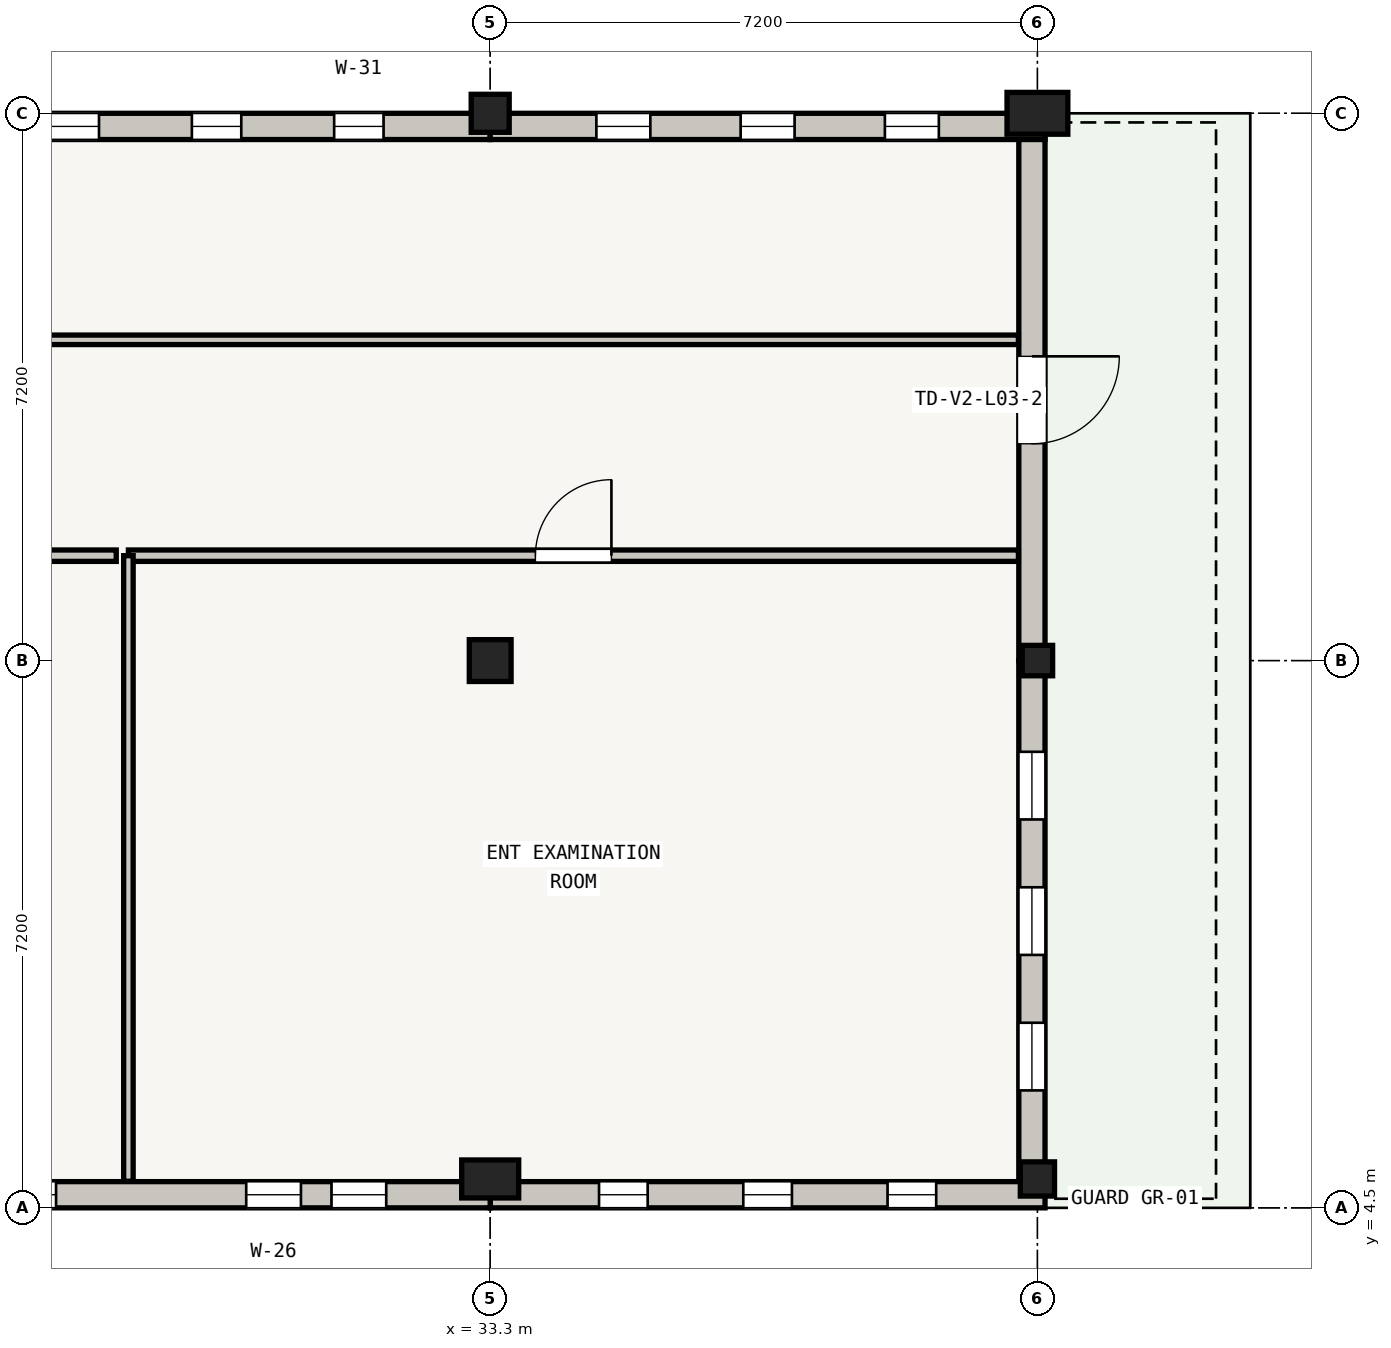
"""IFC4 building model, lengths in metres.
Left out: names, types, materials, properties, quantities, classifications, styles, units other than length and angle.
Written with IfcOpenShell. Run it as: python <this file> out.ifc"""

import sys

from ifc_helpers import new_model, si_unit, direction, frame, frame_2d, origin, origin_2d, place, context, subcontext, project, spatial, rectangle, extrude, element, fill, save


model = new_model("IFC4")
c1 = context("Model", 3, precision=1e-05, world=origin(), true_north=direction((0.0, 1.0)))
c2 = subcontext(c1, "Body", "Model", "MODEL_VIEW")
j1 = project(units=[si_unit("LENGTHUNIT", "METRE"), si_unit("PLANEANGLEUNIT", "RADIAN")], contexts=[c1])
p1 = place(None, origin())
s1 = spatial("IfcSite", under=j1, at=p1, CompositionType="ELEMENT")
p2 = place(p1, origin())
s2 = spatial("IfcBuilding", under=s1, at=p2, CompositionType="ELEMENT")
p3 = place(p2, frame((0.0, 0.0, 12.9)))
s3 = spatial("IfcBuildingStorey", under=s2, at=p3, CompositionType="ELEMENT", Elevation=12.9)
p4 = place(p3, frame((33.3, 4.88, 0.0), z_axis=(0.0, 0.0, 1.0), x_axis=(1.0, 0.0, 0.0)))
e1 = element("IfcColumn", 1, at=p4, inside=s3, PredefinedType="COLUMN", context=c2, shape_type="SweptSolid", body=[
    extrude(rectangle(XDim=0.75, YDim=0.5, at=origin_2d()), origin(), (0.0, 0.0, 1.0), 3.92),
])
p5 = place(p3, frame((33.3, 11.7, 0.0), z_axis=(0.0, 0.0, 1.0), x_axis=(1.0, 0.0, 0.0)))
e2 = element("IfcColumn", 2, at=p5, inside=s3, PredefinedType="COLUMN", context=c2, shape_type="SweptSolid", body=[
    extrude(rectangle(XDim=0.55, YDim=0.55, at=origin_2d()), origin(), (0.0, 0.0, 1.0), 3.92),
])
p6 = place(p3, frame((33.3, 18.9, 0.0), z_axis=(0.0, 0.0, 1.0), x_axis=(1.0, 0.0, 0.0)))
e3 = element("IfcColumn", 3, at=p6, inside=s3, PredefinedType="COLUMN", context=c2, shape_type="SweptSolid", body=[
    extrude(rectangle(XDim=0.5, YDim=0.5, at=origin_2d()), origin(), (0.0, 0.0, 1.0), 3.92),
])
p7 = place(p3, frame((40.5, 4.88, 0.0), z_axis=(0.0, 0.0, 1.0), x_axis=(1.0, 0.0, 0.0)))
e4 = element("IfcColumn", 4, at=p7, inside=s3, PredefinedType="COLUMN", context=c2, shape_type="SweptSolid", body=[
    extrude(rectangle(XDim=0.45, YDim=0.45, at=origin_2d()), origin(), (0.0, 0.0, 1.0), 3.92),
])
p8 = place(p3, frame((40.5, 11.7, 0.0), z_axis=(0.0, 0.0, 1.0), x_axis=(1.0, 0.0, 0.0)))
e5 = element("IfcColumn", 5, at=p8, inside=s3, PredefinedType="COLUMN", context=c2, shape_type="SweptSolid", body=[
    extrude(rectangle(XDim=0.4, YDim=0.4, at=origin_2d()), origin(), (0.0, 0.0, 1.0), 3.92),
])
p9 = place(p3, frame((40.5, 18.9, 0.0), z_axis=(0.0, 0.0, 1.0), x_axis=(1.0, 0.0, 0.0)))
e6 = element("IfcColumn", 6, at=p9, inside=s3, PredefinedType="COLUMN", context=c2, shape_type="SweptSolid", body=[
    extrude(rectangle(XDim=0.8, YDim=0.55, at=origin_2d()), origin(), (0.0, 0.0, 1.0), 3.92),
])
p10 = place(p3, frame((26.1, 18.728, 0.0), z_axis=(0.0, 0.0, 1.0), x_axis=(1.0, 0.0, 0.0)))
e7 = element("IfcWall", 7, at=p10, inside=s3, PredefinedType="SOLIDWALL", context=c2, shape_type="SweptSolid", body=[
    extrude(rectangle(XDim=7.2, YDim=0.345, at=frame_2d((3.6, 0.0))), origin(), (0.0, 0.0, 1.0), 3.105),
])
p11 = place(p10, frame((1.403, 0.0, 0.55)))
e8 = element("IfcOpeningElement", 8, at=p11, cuts=e7, PredefinedType="OPENING", context=c2, shape_type="SweptSolid", body=[
    extrude(rectangle(XDim=0.65, YDim=2.14, at=frame_2d((0.325, 1.07))), frame((0.0, 0.172, 0.0), z_axis=(0.0, -1.0, 0.0), x_axis=(1.0, 0.0, 0.0)), (0.0, 0.0, 1.0), 0.345),
])
p12 = place(p10, frame((3.275, 0.0, 0.55)))
e9 = element("IfcOpeningElement", 9, at=p12, cuts=e7, PredefinedType="OPENING", context=c2, shape_type="SweptSolid", body=[
    extrude(rectangle(XDim=0.65, YDim=2.14, at=frame_2d((0.325, 1.07))), frame((0.0, 0.172, 0.0), z_axis=(0.0, -1.0, 0.0), x_axis=(1.0, 0.0, 0.0)), (0.0, 0.0, 1.0), 0.345),
])
p13 = place(p10, frame((5.147, 0.0, 0.55)))
e10 = element("IfcOpeningElement", 10, at=p13, cuts=e7, PredefinedType="OPENING", context=c2, shape_type="SweptSolid", body=[
    extrude(rectangle(XDim=0.65, YDim=2.14, at=frame_2d((0.325, 1.07))), frame((0.0, 0.172, 0.0), z_axis=(0.0, -1.0, 0.0), x_axis=(1.0, 0.0, 0.0)), (0.0, 0.0, 1.0), 0.345),
])
p14 = place(p3, frame((33.3, 18.728, 0.0), z_axis=(0.0, 0.0, 1.0), x_axis=(1.0, 0.0, 0.0)))
e11 = element("IfcWall", 11, at=p14, inside=s3, PredefinedType="SOLIDWALL", context=c2, shape_type="SweptSolid", body=[
    extrude(rectangle(XDim=7.3, YDim=0.345, at=frame_2d((3.65, 0.0))), origin(), (0.0, 0.0, 1.0), 3.105),
])
p15 = place(p14, frame((1.397, 0.0, 0.55)))
e12 = element("IfcOpeningElement", 12, at=p15, cuts=e11, PredefinedType="OPENING", context=c2, shape_type="SweptSolid", body=[
    extrude(rectangle(XDim=0.71, YDim=2.14, at=frame_2d((0.355, 1.07))), frame((0.0, 0.172, 0.0), z_axis=(0.0, -1.0, 0.0), x_axis=(1.0, 0.0, 0.0)), (0.0, 0.0, 1.0), 0.345),
])
p16 = place(p14, frame((3.295, 0.0, 0.55)))
e13 = element("IfcOpeningElement", 13, at=p16, cuts=e11, PredefinedType="OPENING", context=c2, shape_type="SweptSolid", body=[
    extrude(rectangle(XDim=0.71, YDim=2.14, at=frame_2d((0.355, 1.07))), frame((0.0, 0.172, 0.0), z_axis=(0.0, -1.0, 0.0), x_axis=(1.0, 0.0, 0.0)), (0.0, 0.0, 1.0), 0.345),
])
p17 = place(p14, frame((5.193, 0.0, 0.55)))
e14 = element("IfcOpeningElement", 14, at=p17, cuts=e11, PredefinedType="OPENING", context=c2, shape_type="SweptSolid", body=[
    extrude(rectangle(XDim=0.71, YDim=2.14, at=frame_2d((0.355, 1.07))), frame((0.0, 0.172, 0.0), z_axis=(0.0, -1.0, 0.0), x_axis=(1.0, 0.0, 0.0)), (0.0, 0.0, 1.0), 0.345),
])
p18 = place(p3, frame((40.427, 18.555, 0.0), z_axis=(0.0, 0.0, 1.0), x_axis=(0.0, -1.0, 0.0)))
e15 = element("IfcWall", 15, at=p18, inside=s3, PredefinedType="SOLIDWALL", context=c2, shape_type="SweptSolid", body=[
    extrude(rectangle(XDim=6.855, YDim=0.345, at=frame_2d((3.427, 0.0))), origin(), (0.0, 0.0, 1.0), 2.955),
])
p19 = place(p18, frame((2.853, 0.0, 0.19)))
e16 = element("IfcOpeningElement", 16, at=p19, cuts=e15, PredefinedType="OPENING", context=c2, shape_type="SweptSolid", body=[
    extrude(rectangle(XDim=1.15, YDim=2.02, at=frame_2d((0.575, 1.01))), frame((0.0, 0.172, 0.0), z_axis=(0.0, -1.0, 0.0), x_axis=(1.0, 0.0, 0.0)), (0.0, 0.0, 1.0), 0.345),
])
p20 = place(p3, frame((40.427, 11.7, 0.0), z_axis=(0.0, 0.0, 1.0), x_axis=(0.0, -1.0, 0.0)))
e17 = element("IfcWall", 17, at=p20, inside=s3, PredefinedType="SOLIDWALL", context=c2, shape_type="SweptSolid", body=[
    extrude(rectangle(XDim=6.855, YDim=0.345, at=frame_2d((3.427, 0.0))), origin(), (0.0, 0.0, 1.0), 2.955),
])
p21 = place(p20, frame((1.2, 0.0, 0.55)))
e18 = element("IfcOpeningElement", 18, at=p21, cuts=e17, PredefinedType="OPENING", context=c2, shape_type="SweptSolid", body=[
    extrude(rectangle(XDim=0.89, YDim=2.02, at=frame_2d((0.445, 1.01))), frame((0.0, 0.172, 0.0), z_axis=(0.0, -1.0, 0.0), x_axis=(1.0, 0.0, 0.0)), (0.0, 0.0, 1.0), 0.345),
])
p22 = place(p20, frame((2.982, 0.0, 0.55)))
e19 = element("IfcOpeningElement", 19, at=p22, cuts=e17, PredefinedType="OPENING", context=c2, shape_type="SweptSolid", body=[
    extrude(rectangle(XDim=0.89, YDim=2.02, at=frame_2d((0.445, 1.01))), frame((0.0, 0.172, 0.0), z_axis=(0.0, -1.0, 0.0), x_axis=(1.0, 0.0, 0.0)), (0.0, 0.0, 1.0), 0.345),
])
p23 = place(p20, frame((4.765, 0.0, 0.55)))
e20 = element("IfcOpeningElement", 20, at=p23, cuts=e17, PredefinedType="OPENING", context=c2, shape_type="SweptSolid", body=[
    extrude(rectangle(XDim=0.89, YDim=2.02, at=frame_2d((0.445, 1.01))), frame((0.0, 0.172, 0.0), z_axis=(0.0, -1.0, 0.0), x_axis=(1.0, 0.0, 0.0)), (0.0, 0.0, 1.0), 0.345),
])
p24 = place(p3, frame((40.6, 4.673, 0.0), z_axis=(0.0, 0.0, 1.0), x_axis=(-1.0, 0.0, 0.0)))
e21 = element("IfcWall", 21, at=p24, inside=s3, PredefinedType="SOLIDWALL", context=c2, shape_type="SweptSolid", body=[
    extrude(rectangle(XDim=7.3, YDim=0.345, at=frame_2d((3.65, 0.0))), origin(), (0.0, 0.0, 1.0), 2.955),
])
p25 = place(p24, frame((1.432, 0.0, 0.55)))
e22 = element("IfcOpeningElement", 22, at=p25, cuts=e21, PredefinedType="OPENING", context=c2, shape_type="SweptSolid", body=[
    extrude(rectangle(XDim=0.64, YDim=1.85, at=frame_2d((0.32, 0.925))), frame((0.0, 0.172, 0.0), z_axis=(0.0, -1.0, 0.0), x_axis=(1.0, 0.0, 0.0)), (0.0, 0.0, 1.0), 0.345),
])
p26 = place(p24, frame((3.33, 0.0, 0.55)))
e23 = element("IfcOpeningElement", 23, at=p26, cuts=e21, PredefinedType="OPENING", context=c2, shape_type="SweptSolid", body=[
    extrude(rectangle(XDim=0.64, YDim=1.85, at=frame_2d((0.32, 0.925))), frame((0.0, 0.172, 0.0), z_axis=(0.0, -1.0, 0.0), x_axis=(1.0, 0.0, 0.0)), (0.0, 0.0, 1.0), 0.345),
])
p27 = place(p24, frame((5.228, 0.0, 0.55)))
e24 = element("IfcOpeningElement", 24, at=p27, cuts=e21, PredefinedType="OPENING", context=c2, shape_type="SweptSolid", body=[
    extrude(rectangle(XDim=0.64, YDim=1.85, at=frame_2d((0.32, 0.925))), frame((0.0, 0.172, 0.0), z_axis=(0.0, -1.0, 0.0), x_axis=(1.0, 0.0, 0.0)), (0.0, 0.0, 1.0), 0.345),
])
p28 = place(p3, frame((33.3, 4.673, 0.0), z_axis=(0.0, 0.0, 1.0), x_axis=(-1.0, 0.0, 0.0)))
e25 = element("IfcWall", 25, at=p28, inside=s3, PredefinedType="SOLIDWALL", context=c2, shape_type="SweptSolid", body=[
    extrude(rectangle(XDim=7.2, YDim=0.345, at=frame_2d((3.6, 0.0))), origin(), (0.0, 0.0, 1.0), 3.185),
])
p29 = place(p28, frame((1.368, 0.0, 0.55)))
e26 = element("IfcOpeningElement", 26, at=p29, cuts=e25, PredefinedType="OPENING", context=c2, shape_type="SweptSolid", body=[
    extrude(rectangle(XDim=0.72, YDim=1.85, at=frame_2d((0.36, 0.925))), frame((0.0, 0.172, 0.0), z_axis=(0.0, -1.0, 0.0), x_axis=(1.0, 0.0, 0.0)), (0.0, 0.0, 1.0), 0.345),
])
p30 = place(p28, frame((2.49, 0.0, 0.55)))
e27 = element("IfcOpeningElement", 27, at=p30, cuts=e25, PredefinedType="OPENING", context=c2, shape_type="SweptSolid", body=[
    extrude(rectangle(XDim=0.72, YDim=1.85, at=frame_2d((0.36, 0.925))), frame((0.0, 0.172, 0.0), z_axis=(0.0, -1.0, 0.0), x_axis=(1.0, 0.0, 0.0)), (0.0, 0.0, 1.0), 0.345),
])
p31 = place(p28, frame((5.712, 0.0, 0.55)))
e28 = element("IfcOpeningElement", 28, at=p31, cuts=e25, PredefinedType="OPENING", context=c2, shape_type="SweptSolid", body=[
    extrude(rectangle(XDim=0.72, YDim=1.85, at=frame_2d((0.36, 0.925))), frame((0.0, 0.172, 0.0), z_axis=(0.0, -1.0, 0.0), x_axis=(1.0, 0.0, 0.0)), (0.0, 0.0, 1.0), 0.345),
])
p32 = place(p3, frame((40.25, 15.92, 0.0), z_axis=(0.0, 0.0, 1.0), x_axis=(-1.0, 0.0, 0.0)))
e29 = element("IfcWall", 29, at=p32, inside=s3, PredefinedType="PARTITIONING", context=c2, shape_type="SweptSolid", body=[
    extrude(rectangle(XDim=23.58, YDim=0.125, at=frame_2d((11.79, 0.0))), origin(), (0.0, 0.0, 1.0), 2.94),
])
p33 = place(p3, frame((28.54, 13.08, 0.0), z_axis=(0.0, 0.0, 1.0), x_axis=(1.0, 0.0, 0.0)))
e30 = element("IfcWall", 30, at=p33, inside=s3, PredefinedType="PARTITIONING", context=c2, shape_type="SweptSolid", body=[
    extrude(rectangle(XDim=11.71, YDim=0.15, at=frame_2d((5.855, 0.0))), origin(), (0.0, 0.0, 1.0), 2.94),
])
p34 = place(p33, frame((5.355, 0.0, 0.0)))
e31 = element("IfcOpeningElement", 31, at=p34, cuts=e30, PredefinedType="OPENING", context=c2, shape_type="SweptSolid", body=[
    extrude(rectangle(XDim=1.0, YDim=2.05, at=frame_2d((0.5, 1.025))), frame((0.0, 0.075, 0.0), z_axis=(0.0, -1.0, 0.0), x_axis=(1.0, 0.0, 0.0)), (0.0, 0.0, 1.0), 0.15),
])
p35 = place(p3, frame((28.54, 4.85, 0.0), z_axis=(0.0, 0.0, 1.0), x_axis=(0.0, 1.0, 0.0)))
e32 = element("IfcWall", 32, at=p35, inside=s3, PredefinedType="PARTITIONING", context=c2, shape_type="SweptSolid", body=[
    extrude(rectangle(XDim=8.23, YDim=0.125, at=frame_2d((4.115, 0.0))), origin(), (0.0, 0.0, 1.0), 2.94),
])
p36 = place(p3, frame((16.67, 13.08, 0.0), z_axis=(0.0, 0.0, 1.0), x_axis=(1.0, 0.0, 0.0)))
e33 = element("IfcWall", 33, at=p36, inside=s3, PredefinedType="PARTITIONING", context=c2, shape_type="SweptSolid", body=[
    extrude(rectangle(XDim=11.71, YDim=0.15, at=frame_2d((5.855, 0.0))), origin(), (0.0, 0.0, 1.0), 2.94),
])
p37 = place(p36, frame((5.335, 0.0, 0.0)))
e34 = element("IfcOpeningElement", 34, at=p37, cuts=e33, PredefinedType="OPENING", context=c2, shape_type="SweptSolid", body=[
    extrude(rectangle(XDim=1.04, YDim=2.05, at=frame_2d((0.52, 1.025))), frame((0.0, 0.075, 0.0), z_axis=(0.0, -1.0, 0.0), x_axis=(1.0, 0.0, 0.0)), (0.0, 0.0, 1.0), 0.15),
])
p38 = place(p11, origin())
e35 = element("IfcWindow", 35, at=p38, inside=s3, PartitioningType="SINGLE_PANEL", PredefinedType="WINDOW", context=c2, shape_type="SweptSolid", body=[
    extrude(rectangle(XDim=0.65, YDim=2.14, at=frame_2d((0.325, 1.07))), frame((0.0, 0.03, 0.0), z_axis=(0.0, -1.0, 0.0), x_axis=(1.0, 0.0, 0.0)), (0.0, 0.0, 1.0), 0.06),
])
fill(e8, e35)
p39 = place(p12, origin())
e36 = element("IfcWindow", 36, at=p39, inside=s3, PartitioningType="SINGLE_PANEL", PredefinedType="WINDOW", context=c2, shape_type="SweptSolid", body=[
    extrude(rectangle(XDim=0.65, YDim=2.14, at=frame_2d((0.325, 1.07))), frame((0.0, 0.03, 0.0), z_axis=(0.0, -1.0, 0.0), x_axis=(1.0, 0.0, 0.0)), (0.0, 0.0, 1.0), 0.06),
])
fill(e9, e36)
p40 = place(p13, origin())
e37 = element("IfcWindow", 37, at=p40, inside=s3, PartitioningType="SINGLE_PANEL", PredefinedType="WINDOW", context=c2, shape_type="SweptSolid", body=[
    extrude(rectangle(XDim=0.65, YDim=2.14, at=frame_2d((0.325, 1.07))), frame((0.0, 0.03, 0.0), z_axis=(0.0, -1.0, 0.0), x_axis=(1.0, 0.0, 0.0)), (0.0, 0.0, 1.0), 0.06),
])
fill(e10, e37)
p41 = place(p15, origin())
e38 = element("IfcWindow", 38, at=p41, inside=s3, PartitioningType="SINGLE_PANEL", PredefinedType="WINDOW", context=c2, shape_type="SweptSolid", body=[
    extrude(rectangle(XDim=0.71, YDim=2.14, at=frame_2d((0.355, 1.07))), frame((0.0, 0.03, 0.0), z_axis=(0.0, -1.0, 0.0), x_axis=(1.0, 0.0, 0.0)), (0.0, 0.0, 1.0), 0.06),
])
fill(e12, e38)
p42 = place(p16, origin())
e39 = element("IfcWindow", 39, at=p42, inside=s3, PartitioningType="SINGLE_PANEL", PredefinedType="WINDOW", context=c2, shape_type="SweptSolid", body=[
    extrude(rectangle(XDim=0.71, YDim=2.14, at=frame_2d((0.355, 1.07))), frame((0.0, 0.03, 0.0), z_axis=(0.0, -1.0, 0.0), x_axis=(1.0, 0.0, 0.0)), (0.0, 0.0, 1.0), 0.06),
])
fill(e13, e39)
p43 = place(p17, origin())
e40 = element("IfcWindow", 40, at=p43, inside=s3, PartitioningType="SINGLE_PANEL", PredefinedType="WINDOW", context=c2, shape_type="SweptSolid", body=[
    extrude(rectangle(XDim=0.71, YDim=2.14, at=frame_2d((0.355, 1.07))), frame((0.0, 0.03, 0.0), z_axis=(0.0, -1.0, 0.0), x_axis=(1.0, 0.0, 0.0)), (0.0, 0.0, 1.0), 0.06),
])
fill(e14, e40)
p44 = place(p19, origin())
e41 = element("IfcDoor", 41, at=p44, inside=s3, OperationType="SINGLE_SWING_LEFT", PredefinedType="DOOR", context=c2, shape_type="SweptSolid", body=[
    extrude(rectangle(XDim=1.15, YDim=2.02, at=frame_2d((0.575, 1.01))), frame((0.0, 0.025, 0.0), z_axis=(0.0, -1.0, 0.0), x_axis=(1.0, 0.0, 0.0)), (0.0, 0.0, 1.0), 0.05),
])
fill(e16, e41)
p45 = place(p21, origin())
e42 = element("IfcWindow", 42, at=p45, inside=s3, PartitioningType="DOUBLE_PANEL_VERTICAL", PredefinedType="WINDOW", context=c2, shape_type="SweptSolid", body=[
    extrude(rectangle(XDim=0.89, YDim=2.02, at=frame_2d((0.445, 1.01))), frame((0.0, 0.03, 0.0), z_axis=(0.0, -1.0, 0.0), x_axis=(1.0, 0.0, 0.0)), (0.0, 0.0, 1.0), 0.06),
])
fill(e18, e42)
p46 = place(p22, origin())
e43 = element("IfcWindow", 43, at=p46, inside=s3, PartitioningType="DOUBLE_PANEL_VERTICAL", PredefinedType="WINDOW", context=c2, shape_type="SweptSolid", body=[
    extrude(rectangle(XDim=0.89, YDim=2.02, at=frame_2d((0.445, 1.01))), frame((0.0, 0.03, 0.0), z_axis=(0.0, -1.0, 0.0), x_axis=(1.0, 0.0, 0.0)), (0.0, 0.0, 1.0), 0.06),
])
fill(e19, e43)
p47 = place(p23, origin())
e44 = element("IfcWindow", 44, at=p47, inside=s3, PartitioningType="DOUBLE_PANEL_VERTICAL", PredefinedType="WINDOW", context=c2, shape_type="SweptSolid", body=[
    extrude(rectangle(XDim=0.89, YDim=2.02, at=frame_2d((0.445, 1.01))), frame((0.0, 0.03, 0.0), z_axis=(0.0, -1.0, 0.0), x_axis=(1.0, 0.0, 0.0)), (0.0, 0.0, 1.0), 0.06),
])
fill(e20, e44)
p48 = place(p25, origin())
e45 = element("IfcWindow", 45, at=p48, inside=s3, PartitioningType="SINGLE_PANEL", PredefinedType="WINDOW", context=c2, shape_type="SweptSolid", body=[
    extrude(rectangle(XDim=0.64, YDim=1.85, at=frame_2d((0.32, 0.925))), frame((0.0, 0.03, 0.0), z_axis=(0.0, -1.0, 0.0), x_axis=(1.0, 0.0, 0.0)), (0.0, 0.0, 1.0), 0.06),
])
fill(e22, e45)
p49 = place(p26, origin())
e46 = element("IfcWindow", 46, at=p49, inside=s3, PartitioningType="SINGLE_PANEL", PredefinedType="WINDOW", context=c2, shape_type="SweptSolid", body=[
    extrude(rectangle(XDim=0.64, YDim=1.85, at=frame_2d((0.32, 0.925))), frame((0.0, 0.03, 0.0), z_axis=(0.0, -1.0, 0.0), x_axis=(1.0, 0.0, 0.0)), (0.0, 0.0, 1.0), 0.06),
])
fill(e23, e46)
p50 = place(p27, origin())
e47 = element("IfcWindow", 47, at=p50, inside=s3, PartitioningType="SINGLE_PANEL", PredefinedType="WINDOW", context=c2, shape_type="SweptSolid", body=[
    extrude(rectangle(XDim=0.64, YDim=1.85, at=frame_2d((0.32, 0.925))), frame((0.0, 0.03, 0.0), z_axis=(0.0, -1.0, 0.0), x_axis=(1.0, 0.0, 0.0)), (0.0, 0.0, 1.0), 0.06),
])
fill(e24, e47)
p51 = place(p29, origin())
e48 = element("IfcWindow", 48, at=p51, inside=s3, PartitioningType="SINGLE_PANEL", PredefinedType="WINDOW", context=c2, shape_type="SweptSolid", body=[
    extrude(rectangle(XDim=0.72, YDim=1.85, at=frame_2d((0.36, 0.925))), frame((0.0, 0.03, 0.0), z_axis=(0.0, -1.0, 0.0), x_axis=(1.0, 0.0, 0.0)), (0.0, 0.0, 1.0), 0.06),
])
fill(e26, e48)
p52 = place(p30, origin())
e49 = element("IfcWindow", 49, at=p52, inside=s3, PartitioningType="SINGLE_PANEL", PredefinedType="WINDOW", context=c2, shape_type="SweptSolid", body=[
    extrude(rectangle(XDim=0.72, YDim=1.85, at=frame_2d((0.36, 0.925))), frame((0.0, 0.03, 0.0), z_axis=(0.0, -1.0, 0.0), x_axis=(1.0, 0.0, 0.0)), (0.0, 0.0, 1.0), 0.06),
])
fill(e27, e49)
p53 = place(p31, origin())
e50 = element("IfcWindow", 50, at=p53, inside=s3, PartitioningType="SINGLE_PANEL", PredefinedType="WINDOW", context=c2, shape_type="SweptSolid", body=[
    extrude(rectangle(XDim=0.72, YDim=1.85, at=frame_2d((0.36, 0.925))), frame((0.0, 0.03, 0.0), z_axis=(0.0, -1.0, 0.0), x_axis=(1.0, 0.0, 0.0)), (0.0, 0.0, 1.0), 0.06),
])
fill(e28, e50)
p54 = place(p34, origin())
e51 = element("IfcDoor", 51, at=p54, inside=s3, OperationType="SINGLE_SWING_RIGHT", PredefinedType="DOOR", context=c2, shape_type="SweptSolid", body=[
    extrude(rectangle(XDim=1.0, YDim=2.05, at=frame_2d((0.5, 1.025))), frame((0.0, 0.025, 0.0), z_axis=(0.0, -1.0, 0.0), x_axis=(1.0, 0.0, 0.0)), (0.0, 0.0, 1.0), 0.05),
])
fill(e31, e51)
save(model, sys.argv[1])
